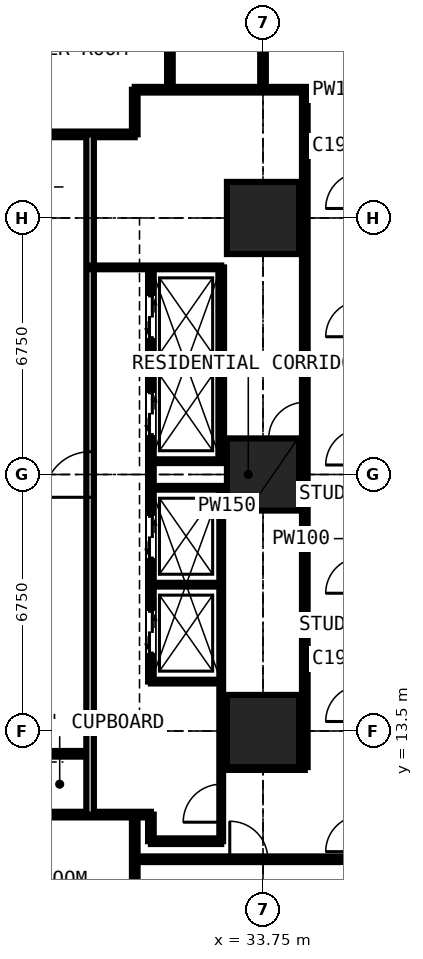
"""IFC4 building model, lengths in metres.
Left out: names, types, materials, properties, quantities, classifications, styles, units other than length and angle.
Written with IfcOpenShell. Run it as: python <this file> out.ifc"""

import sys

from ifc_helpers import new_model, si_unit, direction, frame, frame_2d, origin, origin_2d, place, context, subcontext, project, spatial, rectangle, extrude, element, fill, save


model = new_model("IFC4")
c1 = context("Model", 3, precision=1e-05, world=origin(), true_north=direction((0.0, 1.0)))
c2 = subcontext(c1, "Body", "Model", "MODEL_VIEW")
j1 = project(units=[si_unit("LENGTHUNIT", "METRE"), si_unit("PLANEANGLEUNIT", "RADIAN")], contexts=[c1])
p1 = place(None, origin())
s1 = spatial("IfcSite", under=j1, at=p1, CompositionType="ELEMENT")
p2 = place(p1, origin())
s2 = spatial("IfcBuilding", under=s1, at=p2, CompositionType="ELEMENT")
p3 = place(p2, frame((0.0, 0.0, 32.4)))
s3 = spatial("IfcBuildingStorey", under=s2, at=p3, CompositionType="ELEMENT", Elevation=32.4)
for number, where, z_axis, x_axis in (
    (1, (33.75, 13.5, 0.0), (0.0, 0.0, 1.0), (1.0, 0.0, 0.0)),
    (2, (33.75, 20.25, 0.0), (0.0, 0.0, 1.0), (1.0, 0.0, 0.0)),
    (3, (33.75, 27.0, 0.0), (0.0, 0.0, 1.0), (1.0, 0.0, 0.0)),
):
    element("IfcColumn", number, at=place(p3, frame(where, z_axis=z_axis, x_axis=x_axis)), inside=s3, PredefinedType="COLUMN", context=c2, shape_type="SweptSolid", body=[
        extrude(rectangle(XDim=1.9, YDim=1.9, at=origin_2d()), origin(), (0.0, 0.0, 1.0), 3.6),
    ])
p4 = place(p3, frame((10.125, 11.3, 0.0), z_axis=(0.0, 0.0, 1.0), x_axis=(1.0, 0.0, 0.0)))
e4 = element("IfcWall", 4, at=p4, inside=s3, PredefinedType="PARTITIONING", context=c2, shape_type="SweptSolid", body=[
    extrude(rectangle(XDim=20.675, YDim=0.15, at=frame_2d((10.337, 0.0))), origin(), (0.0, 0.0, 1.0), 3.375),
])
p5 = place(p4, frame((8.375, 0.0, 0.0)))
e5 = element("IfcOpeningElement", 5, at=p5, cuts=e4, PredefinedType="OPENING", context=c2, shape_type="SweptSolid", body=[
    extrude(rectangle(XDim=1.0, YDim=2.2, at=frame_2d((0.5, 1.1))), frame((0.0, 0.085, 0.0), z_axis=(0.0, -1.0, 0.0), x_axis=(1.0, 0.0, 0.0)), (0.0, 0.0, 1.0), 0.17),
])
p6 = place(p4, frame((10.975, 0.0, 0.0)))
e6 = element("IfcOpeningElement", 6, at=p6, cuts=e4, PredefinedType="OPENING", context=c2, shape_type="SweptSolid", body=[
    extrude(rectangle(XDim=1.0, YDim=2.2, at=frame_2d((0.5, 1.1))), frame((0.0, 0.085, 0.0), z_axis=(0.0, -1.0, 0.0), x_axis=(1.0, 0.0, 0.0)), (0.0, 0.0, 1.0), 0.17),
])
p7 = place(p4, frame((3.925, 0.0, 0.0)))
e7 = element("IfcOpeningElement", 7, at=p7, cuts=e4, PredefinedType="OPENING", context=c2, shape_type="SweptSolid", body=[
    extrude(rectangle(XDim=0.95, YDim=2.2, at=frame_2d((0.475, 1.1))), frame((0.0, 0.085, 0.0), z_axis=(0.0, -1.0, 0.0), x_axis=(1.0, 0.0, 0.0)), (0.0, 0.0, 1.0), 0.17),
])
p8 = place(p3, frame((11.3, 29.2, 0.0), z_axis=(0.0, 0.0, 1.0), x_axis=(1.0, 0.0, 0.0)))
e8 = element("IfcWall", 8, at=p8, inside=s3, PredefinedType="PARTITIONING", context=c2, shape_type="SweptSolid", body=[
    extrude(rectangle(XDim=19.075, YDim=0.15, at=frame_2d((9.538, 0.0))), origin(), (0.0, 0.0, 1.0), 3.375),
])
p9 = place(p8, frame((12.875, 0.0, 0.0)))
e9 = element("IfcOpeningElement", 9, at=p9, cuts=e8, PredefinedType="OPENING", context=c2, shape_type="SweptSolid", body=[
    extrude(rectangle(XDim=1.0, YDim=2.2, at=frame_2d((0.5, 1.1))), frame((0.0, 0.085, 0.0), z_axis=(0.0, -1.0, 0.0), x_axis=(1.0, 0.0, 0.0)), (0.0, 0.0, 1.0), 0.17),
])
p10 = place(p8, frame((10.438, 0.0, 0.0)))
e10 = element("IfcOpeningElement", 10, at=p10, cuts=e8, PredefinedType="OPENING", context=c2, shape_type="SweptSolid", body=[
    extrude(rectangle(XDim=1.0, YDim=2.2, at=frame_2d((0.5, 1.1))), frame((0.0, 0.085, 0.0), z_axis=(0.0, -1.0, 0.0), x_axis=(1.0, 0.0, 0.0)), (0.0, 0.0, 1.0), 0.17),
])
p11 = place(p8, frame((15.675, 0.0, 0.0)))
e11 = element("IfcOpeningElement", 11, at=p11, cuts=e8, PredefinedType="OPENING", context=c2, shape_type="SweptSolid", body=[
    extrude(rectangle(XDim=0.95, YDim=2.2, at=frame_2d((0.475, 1.1))), frame((0.0, 0.085, 0.0), z_axis=(0.0, -1.0, 0.0), x_axis=(1.0, 0.0, 0.0)), (0.0, 0.0, 1.0), 0.17),
])
p12 = place(p3, frame((27.6, 12.9, 0.0), z_axis=(0.0, 0.0, 1.0), x_axis=(1.0, 0.0, 0.0)))
e12 = element("IfcWall", 12, at=p12, inside=s3, PredefinedType="PARTITIONING", context=c2, shape_type="SweptSolid", body=[
    extrude(rectangle(XDim=1.6, YDim=0.15, at=frame_2d((0.8, 0.0))), origin(), (0.0, 0.0, 1.0), 2.877),
])
p13 = place(p3, frame((29.2, 11.3, 0.0), z_axis=(0.0, 0.0, 1.0), x_axis=(0.0, 1.0, 0.0)))
e13 = element("IfcWall", 13, at=p13, inside=s3, PredefinedType="PARTITIONING", context=c2, shape_type="SweptSolid", body=[
    extrude(rectangle(XDim=17.9, YDim=0.2, at=frame_2d((8.95, 0.0))), origin(), (0.0, 0.0, 1.0), 3.375),
])
p14 = place(p13, frame((8.35, 0.0, 0.0)))
e14 = element("IfcOpeningElement", 14, at=p14, cuts=e13, PredefinedType="OPENING", context=c2, shape_type="SweptSolid", body=[
    extrude(rectangle(XDim=1.2, YDim=2.2, at=frame_2d((0.6, 1.1))), frame((0.0, 0.11, 0.0), z_axis=(0.0, -1.0, 0.0), x_axis=(1.0, 0.0, 0.0)), (0.0, 0.0, 1.0), 0.22),
])
p15 = place(p3, frame((29.2, 25.7, 0.0), z_axis=(0.0, 0.0, 1.0), x_axis=(1.0, 0.0, 0.0)))
e15 = element("IfcWall", 15, at=p15, inside=s3, PredefinedType="SHEAR", context=c2, shape_type="SweptSolid", body=[
    extrude(rectangle(XDim=3.45, YDim=0.1, at=frame_2d((1.725, 0.0))), origin(), (0.0, 0.0, 1.0), 3.375),
])
p16 = place(p3, frame((30.375, -0.734, 0.0), z_axis=(0.0, 0.0, 1.0), x_axis=(0.0, 1.0, 0.0)))
e16 = element("IfcWall", 16, at=p16, inside=s3, PredefinedType="PARTITIONING", context=c2, shape_type="SweptSolid", body=[
    extrude(rectangle(XDim=12.034, YDim=0.15, at=frame_2d((6.017, 0.0))), origin(), (0.0, 0.0, 1.0), 3.375),
])
p17 = place(p3, frame((30.375, 10.125, 0.0), z_axis=(0.0, 0.0, 1.0), x_axis=(1.0, 0.0, 0.0)))
e17 = element("IfcWall", 17, at=p17, inside=s3, PredefinedType="PARTITIONING", context=c2, shape_type="SweptSolid", body=[
    extrude(rectangle(XDim=10.859, YDim=0.15, at=frame_2d((5.429, 0.0))), origin(), (0.0, 0.0, 1.0), 3.375),
])
p18 = place(p17, frame((2.5, 0.0, 0.0)))
e18 = element("IfcOpeningElement", 18, at=p18, cuts=e17, PredefinedType="OPENING", context=c2, shape_type="SweptSolid", body=[
    extrude(rectangle(XDim=1.0, YDim=2.2, at=frame_2d((0.5, 1.1))), frame((0.0, 0.085, 0.0), z_axis=(0.0, -1.0, 0.0), x_axis=(1.0, 0.0, 0.0)), (0.0, 0.0, 1.0), 0.17),
])
p19 = place(p3, frame((30.375, 29.2, 0.0), z_axis=(0.0, 0.0, 1.0), x_axis=(0.0, 1.0, 0.0)))
e19 = element("IfcWall", 19, at=p19, inside=s3, PredefinedType="PARTITIONING", context=c2, shape_type="SweptSolid", body=[
    extrude(rectangle(XDim=1.175, YDim=0.15, at=frame_2d((0.587, 0.0))), origin(), (0.0, 0.0, 1.0), 3.375),
])
p20 = place(p3, frame((30.375, 30.375, 0.0), z_axis=(0.0, 0.0, 1.0), x_axis=(1.0, 0.0, 0.0)))
e20 = element("IfcWall", 20, at=p20, inside=s3, PredefinedType="PARTITIONING", context=c2, shape_type="SweptSolid", body=[
    extrude(rectangle(XDim=10.859, YDim=0.15, at=frame_2d((5.429, 0.0))), origin(), (0.0, 0.0, 1.0), 3.375),
])
p21 = place(p3, frame((30.8, 10.6, 0.0), z_axis=(0.0, 0.0, 1.0), x_axis=(0.0, 1.0, 0.0)))
e21 = element("IfcWall", 21, at=p21, inside=s3, PredefinedType="PARTITIONING", context=c2, shape_type="SweptSolid", body=[
    extrude(rectangle(XDim=0.7, YDim=0.15, at=frame_2d((0.35, 0.0))), origin(), (0.0, 0.0, 1.0), 3.375),
])
p22 = place(p3, frame((30.8, 10.6, 0.0), z_axis=(0.0, 0.0, 1.0), x_axis=(1.0, 0.0, 0.0)))
e22 = element("IfcWall", 22, at=p22, inside=s3, PredefinedType="PARTITIONING", context=c2, shape_type="SweptSolid", body=[
    extrude(rectangle(XDim=1.85, YDim=0.15, at=frame_2d((0.925, 0.0))), origin(), (0.0, 0.0, 1.0), 3.375),
])
p23 = place(p3, frame((30.8, 14.8, 0.0), z_axis=(0.0, 0.0, 1.0), x_axis=(0.0, 1.0, 0.0)))
e23 = element("IfcWall", 23, at=p23, inside=s3, PredefinedType="PARTITIONING", context=c2, shape_type="SweptSolid", body=[
    extrude(rectangle(XDim=10.9, YDim=0.15, at=frame_2d((5.45, 0.0))), origin(), (0.0, 0.0, 1.0), 3.375),
])
p24 = place(p23, frame((0.75, 0.0, 0.0)))
e24 = element("IfcOpeningElement", 24, at=p24, cuts=e23, PredefinedType="OPENING", context=c2, shape_type="SweptSolid", body=[
    extrude(rectangle(XDim=1.1, YDim=2.2, at=frame_2d((0.55, 1.1))), frame((0.0, 0.085, 0.0), z_axis=(0.0, -1.0, 0.0), x_axis=(1.0, 0.0, 0.0)), (0.0, 0.0, 1.0), 0.17),
])
p25 = place(p23, frame((3.25, 0.0, 0.0)))
e25 = element("IfcOpeningElement", 25, at=p25, cuts=e23, PredefinedType="OPENING", context=c2, shape_type="SweptSolid", body=[
    extrude(rectangle(XDim=1.1, YDim=2.2, at=frame_2d((0.55, 1.1))), frame((0.0, 0.085, 0.0), z_axis=(0.0, -1.0, 0.0), x_axis=(1.0, 0.0, 0.0)), (0.0, 0.0, 1.0), 0.17),
])
p26 = place(p23, frame((6.5, 0.0, 0.0)))
e26 = element("IfcOpeningElement", 26, at=p26, cuts=e23, PredefinedType="OPENING", context=c2, shape_type="SweptSolid", body=[
    extrude(rectangle(XDim=1.1, YDim=2.2, at=frame_2d((0.55, 1.1))), frame((0.0, 0.085, 0.0), z_axis=(0.0, -1.0, 0.0), x_axis=(1.0, 0.0, 0.0)), (0.0, 0.0, 1.0), 0.17),
])
p27 = place(p23, frame((9.05, 0.0, 0.0)))
e27 = element("IfcOpeningElement", 27, at=p27, cuts=e23, PredefinedType="OPENING", context=c2, shape_type="SweptSolid", body=[
    extrude(rectangle(XDim=1.1, YDim=2.2, at=frame_2d((0.55, 1.1))), frame((0.0, 0.085, 0.0), z_axis=(0.0, -1.0, 0.0), x_axis=(1.0, 0.0, 0.0)), (0.0, 0.0, 1.0), 0.17),
])
for number, where, z_axis, x_axis in (
    (28, (30.8, 14.8, 0.0), (0.0, 0.0, 1.0), (1.0, 0.0, 0.0)),
    (29, (30.8, 17.35, 0.0), (0.0, 0.0, 1.0), (1.0, 0.0, 0.0)),
    (30, (30.8, 19.9, 0.0), (0.0, 0.0, 1.0), (1.0, 0.0, 0.0)),
    (31, (30.8, 20.6, 0.0), (0.0, 0.0, 1.0), (1.0, 0.0, 0.0)),
    (32, (30.8, 23.15, 0.0), (0.0, 0.0, 1.0), (1.0, 0.0, 0.0)),
):
    element("IfcWall", number, at=place(p3, frame(where, z_axis=z_axis, x_axis=x_axis)), inside=s3, PredefinedType="SHEAR", context=c2, shape_type="SweptSolid", body=[
        extrude(rectangle(XDim=1.85, YDim=0.1, at=frame_2d((0.925, 0.0))), origin(), (0.0, 0.0, 1.0), 3.375),
    ])
p28 = place(p3, frame((31.3, 30.375, 0.0), z_axis=(0.0, 0.0, 1.0), x_axis=(0.0, 1.0, 0.0)))
e33 = element("IfcWall", 33, at=p28, inside=s3, PredefinedType="PARTITIONING", context=c2, shape_type="SweptSolid", body=[
    extrude(rectangle(XDim=4.475, YDim=0.15, at=frame_2d((2.238, 0.0))), origin(), (0.0, 0.0, 1.0), 3.375),
])
p29 = place(p3, frame((32.65, 10.6, 0.0), z_axis=(0.0, 0.0, 1.0), x_axis=(0.0, 1.0, 0.0)))
e34 = element("IfcWall", 34, at=p29, inside=s3, PredefinedType="SHEAR", context=c2, shape_type="SweptSolid", body=[
    extrude(rectangle(XDim=9.3, YDim=0.1, at=frame_2d((4.65, 0.0))), origin(), (0.0, 0.0, 1.0), 3.375),
])
p30 = place(p29, frame((0.5, 0.0, 0.0)))
e35 = element("IfcOpeningElement", 35, at=p30, cuts=e34, PredefinedType="OPENING", context=c2, shape_type="SweptSolid", body=[
    extrude(rectangle(XDim=1.0, YDim=2.2, at=frame_2d((0.5, 1.1))), frame((0.0, 0.06, 0.0), z_axis=(0.0, -1.0, 0.0), x_axis=(1.0, 0.0, 0.0)), (0.0, 0.0, 1.0), 0.12),
])
p31 = place(p3, frame((32.65, 12.55, 0.0), z_axis=(0.0, 0.0, 1.0), x_axis=(1.0, 0.0, 0.0)))
e36 = element("IfcWall", 36, at=p31, inside=s3, PredefinedType="PARTITIONING", context=c2, shape_type="SweptSolid", body=[
    extrude(rectangle(XDim=2.2, YDim=0.15, at=frame_2d((1.1, 0.0))), origin(), (0.0, 0.0, 1.0), 3.375),
])
p32 = place(p3, frame((32.65, 20.6, 0.0), z_axis=(0.0, 0.0, 1.0), x_axis=(0.0, 1.0, 0.0)))
e37 = element("IfcWall", 37, at=p32, inside=s3, PredefinedType="PARTITIONING", context=c2, shape_type="SweptSolid", body=[
    extrude(rectangle(XDim=5.1, YDim=0.15, at=frame_2d((2.55, 0.0))), origin(), (0.0, 0.0, 1.0), 3.375),
])
p33 = place(p3, frame((33.75, 30.375, 0.0), z_axis=(0.0, 0.0, 1.0), x_axis=(0.0, 1.0, 0.0)))
e38 = element("IfcWall", 38, at=p33, inside=s3, PredefinedType="PARTITIONING", context=c2, shape_type="SweptSolid", body=[
    extrude(rectangle(XDim=10.859, YDim=0.15, at=frame_2d((5.429, 0.0))), origin(), (0.0, 0.0, 1.0), 2.877),
])
p34 = place(p33, frame((1.4, 0.0, 0.0)))
e39 = element("IfcOpeningElement", 39, at=p34, cuts=e38, PredefinedType="OPENING", context=c2, shape_type="SweptSolid", body=[
    extrude(rectangle(XDim=1.0, YDim=2.2, at=frame_2d((0.5, 1.1))), frame((0.0, 0.085, 0.0), z_axis=(0.0, -1.0, 0.0), x_axis=(1.0, 0.0, 0.0)), (0.0, 0.0, 1.0), 0.17),
])
p35 = place(p3, frame((34.85, 12.55, 0.0), z_axis=(0.0, 0.0, 1.0), x_axis=(0.0, 1.0, 0.0)))
e40 = element("IfcWall", 40, at=p35, inside=s3, PredefinedType="PARTITIONING", context=c2, shape_type="SweptSolid", body=[
    extrude(rectangle(XDim=17.825, YDim=0.15, at=frame_2d((8.913, 0.0))), origin(), (0.0, 0.0, 1.0), 3.375),
])
p36 = place(p35, frame((8.65, 0.0, 0.0)))
e41 = element("IfcOpeningElement", 41, at=p36, cuts=e40, PredefinedType="OPENING", context=c2, shape_type="SweptSolid", body=[
    extrude(rectangle(XDim=0.95, YDim=2.2, at=frame_2d((0.475, 1.1))), frame((0.0, 0.085, 0.0), z_axis=(0.0, -1.0, 0.0), x_axis=(1.0, 0.0, 0.0)), (0.0, 0.0, 1.0), 0.17),
])
p37 = place(p18, origin())
e42 = element("IfcDoor", 42, at=p37, inside=s3, OperationType="SINGLE_SWING_LEFT", PredefinedType="DOOR", context=c2, shape_type="SweptSolid", body=[
    extrude(rectangle(XDim=1.0, YDim=2.2, at=frame_2d((0.5, 1.1))), frame((0.0, 0.025, 0.0), z_axis=(0.0, -1.0, 0.0), x_axis=(1.0, 0.0, 0.0)), (0.0, 0.0, 1.0), 0.05),
])
fill(e18, e42)
p38 = place(p30, origin())
e43 = element("IfcDoor", 43, at=p38, inside=s3, OperationType="SINGLE_SWING_LEFT", PredefinedType="DOOR", context=c2, shape_type="SweptSolid", body=[
    extrude(rectangle(XDim=1.0, YDim=2.2, at=frame_2d((0.5, 1.1))), frame((0.0, 0.025, 0.0), z_axis=(0.0, -1.0, 0.0), x_axis=(1.0, 0.0, 0.0)), (0.0, 0.0, 1.0), 0.05),
])
fill(e35, e43)
p39 = place(p36, origin())
e44 = element("IfcDoor", 44, at=p39, inside=s3, OperationType="SINGLE_SWING_LEFT", PredefinedType="DOOR", context=c2, shape_type="SweptSolid", body=[
    extrude(rectangle(XDim=0.95, YDim=2.2, at=frame_2d((0.475, 1.1))), frame((0.0, 0.025, 0.0), z_axis=(0.0, -1.0, 0.0), x_axis=(1.0, 0.0, 0.0)), (0.0, 0.0, 1.0), 0.05),
])
fill(e41, e44)
p40 = place(p24, origin())
e45 = element("IfcDoor", 45, at=p40, inside=s3, OperationType="DOUBLE_DOOR_SLIDING", PredefinedType="DOOR", context=c2, shape_type="SweptSolid", body=[
    extrude(rectangle(XDim=1.1, YDim=2.2, at=frame_2d((0.55, 1.1))), frame((0.0, 0.025, 0.0), z_axis=(0.0, -1.0, 0.0), x_axis=(1.0, 0.0, 0.0)), (0.0, 0.0, 1.0), 0.05),
])
fill(e24, e45)
p41 = place(p25, origin())
e46 = element("IfcDoor", 46, at=p41, inside=s3, OperationType="DOUBLE_DOOR_SLIDING", PredefinedType="DOOR", context=c2, shape_type="SweptSolid", body=[
    extrude(rectangle(XDim=1.1, YDim=2.2, at=frame_2d((0.55, 1.1))), frame((0.0, 0.025, 0.0), z_axis=(0.0, -1.0, 0.0), x_axis=(1.0, 0.0, 0.0)), (0.0, 0.0, 1.0), 0.05),
])
fill(e25, e46)
p42 = place(p26, origin())
e47 = element("IfcDoor", 47, at=p42, inside=s3, OperationType="DOUBLE_DOOR_SLIDING", PredefinedType="DOOR", context=c2, shape_type="SweptSolid", body=[
    extrude(rectangle(XDim=1.1, YDim=2.2, at=frame_2d((0.55, 1.1))), frame((0.0, 0.025, 0.0), z_axis=(0.0, -1.0, 0.0), x_axis=(1.0, 0.0, 0.0)), (0.0, 0.0, 1.0), 0.05),
])
fill(e26, e47)
p43 = place(p27, origin())
e48 = element("IfcDoor", 48, at=p43, inside=s3, OperationType="DOUBLE_DOOR_SLIDING", PredefinedType="DOOR", context=c2, shape_type="SweptSolid", body=[
    extrude(rectangle(XDim=1.1, YDim=2.2, at=frame_2d((0.55, 1.1))), frame((0.0, 0.025, 0.0), z_axis=(0.0, -1.0, 0.0), x_axis=(1.0, 0.0, 0.0)), (0.0, 0.0, 1.0), 0.05),
])
fill(e27, e48)
p44 = place(p14, origin())
e49 = element("IfcDoor", 49, at=p44, inside=s3, OperationType="DOUBLE_DOOR_SINGLE_SWING", PredefinedType="DOOR", context=c2, shape_type="SweptSolid", body=[
    extrude(rectangle(XDim=1.2, YDim=2.2, at=frame_2d((0.6, 1.1))), frame((0.0, 0.025, 0.0), z_axis=(0.0, -1.0, 0.0), x_axis=(1.0, 0.0, 0.0)), (0.0, 0.0, 1.0), 0.05),
])
fill(e14, e49)
save(model, sys.argv[1])
